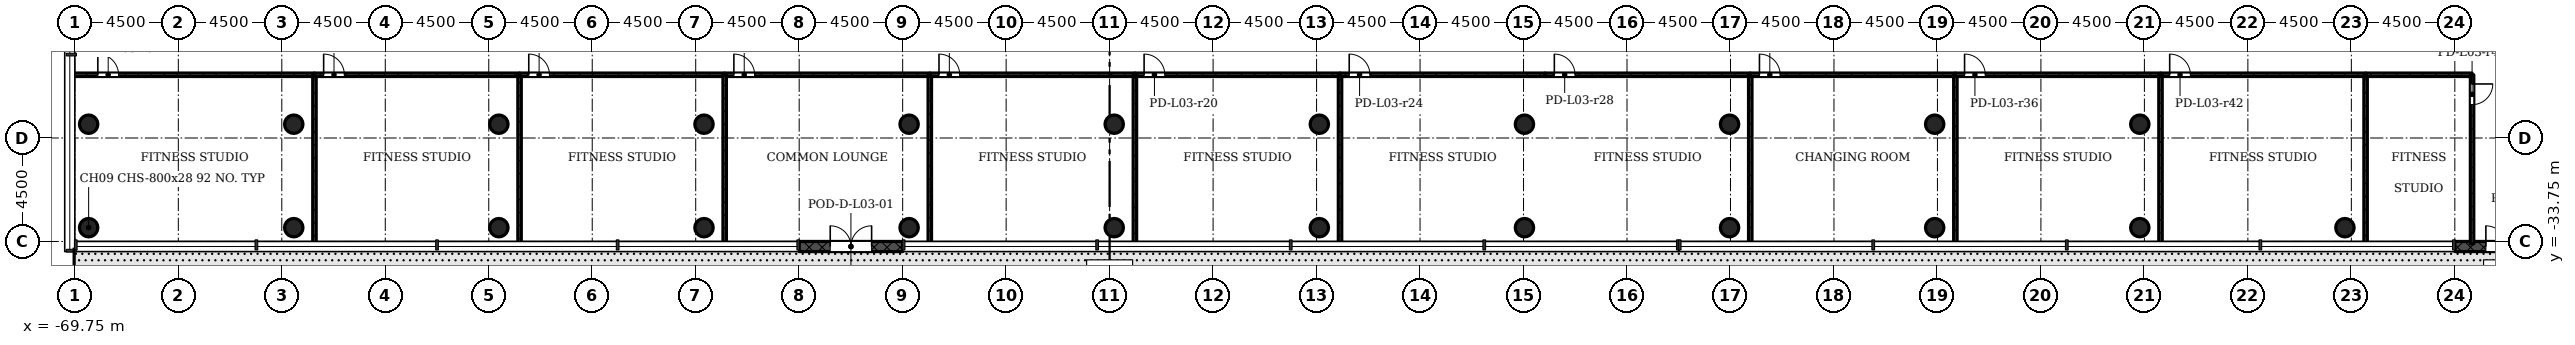
"""IFC4 building model, lengths in metres.
Left out: names, types, materials, properties, quantities, classifications, styles, units other than length and angle.
Written with IfcOpenShell. Run it as: python <this file> out.ifc"""

import sys

from ifc_helpers import new_model, si_unit, direction, frame, frame_2d, origin, origin_2d, place, context, subcontext, project, spatial, rectangle, hollow_circle, extrude, element, fill, save


model = new_model("IFC4")
c1 = context("Model", 3, precision=1e-05, world=origin(), true_north=direction((0.0, 1.0)))
c2 = subcontext(c1, "Body", "Model", "MODEL_VIEW")
j1 = project(units=[si_unit("LENGTHUNIT", "METRE"), si_unit("PLANEANGLEUNIT", "RADIAN")], contexts=[c1])
p1 = place(None, origin())
s1 = spatial("IfcSite", under=j1, at=p1, CompositionType="ELEMENT")
p2 = place(p1, origin())
s2 = spatial("IfcBuilding", under=s1, at=p2, CompositionType="ELEMENT")
p3 = place(p2, frame((0.0, 0.0, 15.5)))
s3 = spatial("IfcBuildingStorey", under=s2, at=p3, CompositionType="ELEMENT", Elevation=15.5)
for number, where, z_axis, x_axis in (
    (1, (-69.15, -33.15, 0.0), (0.0, 0.0, 1.0), (1.0, 0.0, 0.0)),
    (2, (-60.23, -33.15, 0.0), (0.0, 0.0, 1.0), (1.0, 0.0, 0.0)),
    (3, (-51.31, -33.15, 0.0), (0.0, 0.0, 1.0), (1.0, 0.0, 0.0)),
    (4, (-42.39, -33.15, 0.0), (0.0, 0.0, 1.0), (1.0, 0.0, 0.0)),
    (5, (-33.47, -33.15, 0.0), (0.0, 0.0, 1.0), (1.0, 0.0, 0.0)),
    (6, (-24.55, -33.15, 0.0), (0.0, 0.0, 1.0), (1.0, 0.0, 0.0)),
    (7, (-15.63, -33.15, 0.0), (0.0, 0.0, 1.0), (1.0, 0.0, 0.0)),
    (8, (-6.71, -33.15, 0.0), (0.0, 0.0, 1.0), (1.0, 0.0, 0.0)),
    (9, (2.21, -33.15, 0.0), (0.0, 0.0, 1.0), (1.0, 0.0, 0.0)),
    (10, (11.13, -33.15, 0.0), (0.0, 0.0, 1.0), (1.0, 0.0, 0.0)),
    (11, (20.05, -33.15, 0.0), (0.0, 0.0, 1.0), (1.0, 0.0, 0.0)),
    (12, (28.97, -33.15, 0.0), (0.0, 0.0, 1.0), (1.0, 0.0, 0.0)),
):
    element("IfcColumn", number, at=place(p3, frame(where, z_axis=z_axis, x_axis=x_axis)), inside=s3, PredefinedType="COLUMN", context=c2, shape_type="SweptSolid", body=[
        extrude(hollow_circle(Radius=0.4, WallThickness=0.028, at=origin_2d()), origin(), (0.0, 0.0, 1.0), 4.08),
    ])
for number, where, z_axis, x_axis in (
    (13, (-69.15, -28.65, 0.0), (0.0, 0.0, 1.0), (1.0, 0.0, 0.0)),
    (14, (-60.23, -28.65, 0.0), (0.0, 0.0, 1.0), (1.0, 0.0, 0.0)),
    (15, (-51.31, -28.65, 0.0), (0.0, 0.0, 1.0), (1.0, 0.0, 0.0)),
    (16, (-42.39, -28.65, 0.0), (0.0, 0.0, 1.0), (1.0, 0.0, 0.0)),
    (17, (-33.47, -28.65, 0.0), (0.0, 0.0, 1.0), (1.0, 0.0, 0.0)),
    (18, (-24.55, -28.65, 0.0), (0.0, 0.0, 1.0), (1.0, 0.0, 0.0)),
    (19, (-15.63, -28.65, 0.0), (0.0, 0.0, 1.0), (1.0, 0.0, 0.0)),
    (20, (-6.71, -28.65, 0.0), (0.0, 0.0, 1.0), (1.0, 0.0, 0.0)),
    (21, (2.21, -28.65, 0.0), (0.0, 0.0, 1.0), (1.0, 0.0, 0.0)),
    (22, (11.13, -28.65, 0.0), (0.0, 0.0, 1.0), (1.0, 0.0, 0.0)),
    (23, (20.05, -28.65, 0.0), (0.0, 0.0, 1.0), (1.0, 0.0, 0.0)),
):
    element("IfcColumn", number, at=place(p3, frame(where, z_axis=z_axis, x_axis=x_axis)), inside=s3, PredefinedType="COLUMN", context=c2, shape_type="SweptSolid", body=[
        extrude(hollow_circle(Radius=0.4, WallThickness=0.028, at=origin_2d()), origin(), (0.0, 0.0, 1.0), 4.5),
    ])
p4 = place(p3, frame((-38.25, -33.97, -0.02), z_axis=(0.0, 0.0, 1.0), x_axis=(1.0, 0.0, 0.0)))
e24 = element("IfcWall", 24, at=p4, inside=s3, PredefinedType="STANDARD", context=c2, shape_type="SweptSolid", body=[
    extrude(rectangle(XDim=4.5, YDim=0.44, at=frame_2d((2.25, 0.0))), origin(), (0.0, 0.0, 1.0), 4.22),
])
p5 = place(p4, frame((1.35, 0.0, 0.02)))
e25 = element("IfcOpeningElement", 25, at=p5, cuts=e24, PredefinedType="OPENING", context=c2, shape_type="SweptSolid", body=[
    extrude(rectangle(XDim=1.8, YDim=2.1, at=frame_2d((0.9, 1.05))), frame((0.0, 0.23, 0.0), z_axis=(0.0, -1.0, 0.0), x_axis=(1.0, 0.0, 0.0)), (0.0, 0.0, 1.0), 0.46),
])
p6 = place(p3, frame((33.75, -33.97, -0.02), z_axis=(0.0, 0.0, 1.0), x_axis=(1.0, 0.0, 0.0)))
e26 = element("IfcWall", 26, at=p6, inside=s3, PredefinedType="STANDARD", context=c2, shape_type="SweptSolid", body=[
    extrude(rectangle(XDim=4.5, YDim=0.44, at=frame_2d((2.25, 0.0))), origin(), (0.0, 0.0, 1.0), 4.22),
])
p7 = place(p6, frame((1.35, 0.0, 0.02)))
e27 = element("IfcOpeningElement", 27, at=p7, cuts=e26, PredefinedType="OPENING", context=c2, shape_type="SweptSolid", body=[
    extrude(rectangle(XDim=1.8, YDim=2.1, at=frame_2d((0.9, 1.05))), frame((0.0, 0.23, 0.0), z_axis=(0.0, -1.0, 0.0), x_axis=(1.0, 0.0, 0.0)), (0.0, 0.0, 1.0), 0.46),
])
p8 = place(p3, frame((-69.85, -26.5, 0.0), z_axis=(0.0, 0.0, 1.0), x_axis=(1.0, 0.0, 0.0)))
e28 = element("IfcWall", 28, at=p8, inside=s3, PredefinedType="PARTITIONING", context=c2, shape_type="SweptSolid", body=[
    extrude(rectangle(XDim=10.52, YDim=0.15, at=frame_2d((5.26, 0.0))), origin(), (0.0, 0.0, 1.0), 4.08),
])
p9 = place(p8, frame((1.1, 0.0, 0.0)))
e29 = element("IfcOpeningElement", 29, at=p9, cuts=e28, PredefinedType="OPENING", context=c2, shape_type="SweptSolid", body=[
    extrude(rectangle(XDim=0.9, YDim=2.1, at=frame_2d((0.45, 1.05))), frame((0.0, 0.085, 0.0), z_axis=(0.0, -1.0, 0.0), x_axis=(1.0, 0.0, 0.0)), (0.0, 0.0, 1.0), 0.17),
])
p10 = place(p3, frame((-59.33, -26.5, 0.0), z_axis=(0.0, 0.0, 1.0), x_axis=(0.0, -1.0, 0.0)))
e30 = element("IfcWall", 30, at=p10, inside=s3, PredefinedType="PARTITIONING", context=c2, shape_type="SweptSolid", body=[
    extrude(rectangle(XDim=7.35, YDim=0.15, at=frame_2d((3.675, 0.0))), origin(), (0.0, 0.0, 1.0), 4.08),
])
p11 = place(p3, frame((-59.33, -26.5, 0.0), z_axis=(0.0, 0.0, 1.0), x_axis=(1.0, 0.0, 0.0)))
e31 = element("IfcWall", 31, at=p11, inside=s3, PredefinedType="PARTITIONING", context=c2, shape_type="SweptSolid", body=[
    extrude(rectangle(XDim=8.92, YDim=0.15, at=frame_2d((4.46, 0.0))), origin(), (0.0, 0.0, 1.0), 4.08),
])
p12 = place(p11, frame((0.4, 0.0, 0.0)))
e32 = element("IfcOpeningElement", 32, at=p12, cuts=e31, PredefinedType="OPENING", context=c2, shape_type="SweptSolid", body=[
    extrude(rectangle(XDim=0.9, YDim=2.1, at=frame_2d((0.45, 1.05))), frame((0.0, 0.085, 0.0), z_axis=(0.0, -1.0, 0.0), x_axis=(1.0, 0.0, 0.0)), (0.0, 0.0, 1.0), 0.17),
])
p13 = place(p3, frame((-50.41, -26.5, 0.0), z_axis=(0.0, 0.0, 1.0), x_axis=(0.0, -1.0, 0.0)))
e33 = element("IfcWall", 33, at=p13, inside=s3, PredefinedType="PARTITIONING", context=c2, shape_type="SweptSolid", body=[
    extrude(rectangle(XDim=7.35, YDim=0.15, at=frame_2d((3.675, 0.0))), origin(), (0.0, 0.0, 1.0), 4.08),
])
p14 = place(p3, frame((-50.41, -26.5, 0.0), z_axis=(0.0, 0.0, 1.0), x_axis=(1.0, 0.0, 0.0)))
e34 = element("IfcWall", 34, at=p14, inside=s3, PredefinedType="PARTITIONING", context=c2, shape_type="SweptSolid", body=[
    extrude(rectangle(XDim=8.92, YDim=0.15, at=frame_2d((4.46, 0.0))), origin(), (0.0, 0.0, 1.0), 4.08),
])
p15 = place(p14, frame((0.4, 0.0, 0.0)))
e35 = element("IfcOpeningElement", 35, at=p15, cuts=e34, PredefinedType="OPENING", context=c2, shape_type="SweptSolid", body=[
    extrude(rectangle(XDim=0.9, YDim=2.1, at=frame_2d((0.45, 1.05))), frame((0.0, 0.085, 0.0), z_axis=(0.0, -1.0, 0.0), x_axis=(1.0, 0.0, 0.0)), (0.0, 0.0, 1.0), 0.17),
])
p16 = place(p3, frame((-41.49, -26.5, 0.0), z_axis=(0.0, 0.0, 1.0), x_axis=(1.0, 0.0, 0.0)))
e36 = element("IfcWall", 36, at=p16, inside=s3, PredefinedType="PARTITIONING", context=c2, shape_type="SweptSolid", body=[
    extrude(rectangle(XDim=8.92, YDim=0.15, at=frame_2d((4.46, 0.0))), origin(), (0.0, 0.0, 1.0), 4.08),
])
p17 = place(p16, frame((0.4, 0.0, 0.0)))
e37 = element("IfcOpeningElement", 37, at=p17, cuts=e36, PredefinedType="OPENING", context=c2, shape_type="SweptSolid", body=[
    extrude(rectangle(XDim=0.9, YDim=2.1, at=frame_2d((0.45, 1.05))), frame((0.0, 0.085, 0.0), z_axis=(0.0, -1.0, 0.0), x_axis=(1.0, 0.0, 0.0)), (0.0, 0.0, 1.0), 0.17),
])
for number, where, z_axis, x_axis in (
    (38, (-41.49, -33.85, 0.0), (0.0, 0.0, 1.0), (0.0, 1.0, 0.0)),
    (39, (-32.57, -26.5, 0.0), (0.0, 0.0, 1.0), (0.0, -1.0, 0.0)),
):
    element("IfcWall", number, at=place(p3, frame(where, z_axis=z_axis, x_axis=x_axis)), inside=s3, PredefinedType="PARTITIONING", context=c2, shape_type="SweptSolid", body=[
        extrude(rectangle(XDim=7.35, YDim=0.15, at=frame_2d((3.675, 0.0))), origin(), (0.0, 0.0, 1.0), 4.08),
    ])
p18 = place(p3, frame((-32.57, -26.5, 0.0), z_axis=(0.0, 0.0, 1.0), x_axis=(1.0, 0.0, 0.0)))
e40 = element("IfcWall", 40, at=p18, inside=s3, PredefinedType="PARTITIONING", context=c2, shape_type="SweptSolid", body=[
    extrude(rectangle(XDim=8.92, YDim=0.15, at=frame_2d((4.46, 0.0))), origin(), (0.0, 0.0, 1.0), 4.08),
])
p19 = place(p18, frame((0.4, 0.0, 0.0)))
e41 = element("IfcOpeningElement", 41, at=p19, cuts=e40, PredefinedType="OPENING", context=c2, shape_type="SweptSolid", body=[
    extrude(rectangle(XDim=0.9, YDim=2.1, at=frame_2d((0.45, 1.05))), frame((0.0, 0.085, 0.0), z_axis=(0.0, -1.0, 0.0), x_axis=(1.0, 0.0, 0.0)), (0.0, 0.0, 1.0), 0.17),
])
p20 = place(p3, frame((-23.65, -26.5, 0.0), z_axis=(0.0, 0.0, 1.0), x_axis=(0.0, -1.0, 0.0)))
e42 = element("IfcWall", 42, at=p20, inside=s3, PredefinedType="PARTITIONING", context=c2, shape_type="SweptSolid", body=[
    extrude(rectangle(XDim=7.35, YDim=0.15, at=frame_2d((3.675, 0.0))), origin(), (0.0, 0.0, 1.0), 4.08),
])
p21 = place(p3, frame((-23.65, -26.5, 0.0), z_axis=(0.0, 0.0, 1.0), x_axis=(1.0, 0.0, 0.0)))
e43 = element("IfcWall", 43, at=p21, inside=s3, PredefinedType="PARTITIONING", context=c2, shape_type="SweptSolid", body=[
    extrude(rectangle(XDim=8.92, YDim=0.15, at=frame_2d((4.46, 0.0))), origin(), (0.0, 0.0, 1.0), 4.08),
])
p22 = place(p21, frame((0.4, 0.0, 0.0)))
e44 = element("IfcOpeningElement", 44, at=p22, cuts=e43, PredefinedType="OPENING", context=c2, shape_type="SweptSolid", body=[
    extrude(rectangle(XDim=0.9, YDim=2.1, at=frame_2d((0.45, 1.05))), frame((0.0, 0.085, 0.0), z_axis=(0.0, -1.0, 0.0), x_axis=(1.0, 0.0, 0.0)), (0.0, 0.0, 1.0), 0.17),
])
p23 = place(p3, frame((-14.73, -26.5, 0.0), z_axis=(0.0, 0.0, 1.0), x_axis=(0.0, -1.0, 0.0)))
e45 = element("IfcWall", 45, at=p23, inside=s3, PredefinedType="PARTITIONING", context=c2, shape_type="SweptSolid", body=[
    extrude(rectangle(XDim=7.35, YDim=0.15, at=frame_2d((3.675, 0.0))), origin(), (0.0, 0.0, 1.0), 4.08),
])
p24 = place(p3, frame((-14.73, -26.5, 0.0), z_axis=(0.0, 0.0, 1.0), x_axis=(1.0, 0.0, 0.0)))
e46 = element("IfcWall", 46, at=p24, inside=s3, PredefinedType="PARTITIONING", context=c2, shape_type="SweptSolid", body=[
    extrude(rectangle(XDim=8.92, YDim=0.15, at=frame_2d((4.46, 0.0))), origin(), (0.0, 0.0, 1.0), 4.08),
])
p25 = place(p24, frame((0.4, 0.0, 0.0)))
e47 = element("IfcOpeningElement", 47, at=p25, cuts=e46, PredefinedType="OPENING", context=c2, shape_type="SweptSolid", body=[
    extrude(rectangle(XDim=0.9, YDim=2.1, at=frame_2d((0.45, 1.05))), frame((0.0, 0.085, 0.0), z_axis=(0.0, -1.0, 0.0), x_axis=(1.0, 0.0, 0.0)), (0.0, 0.0, 1.0), 0.17),
])
p26 = place(p3, frame((-5.81, -26.5, 0.0), z_axis=(0.0, 0.0, 1.0), x_axis=(1.0, 0.0, 0.0)))
e48 = element("IfcWall", 48, at=p26, inside=s3, PredefinedType="PARTITIONING", context=c2, shape_type="SweptSolid", body=[
    extrude(rectangle(XDim=8.92, YDim=0.15, at=frame_2d((4.46, 0.0))), origin(), (0.0, 0.0, 1.0), 4.08),
])
p27 = place(p26, frame((0.4, 0.0, 0.0)))
e49 = element("IfcOpeningElement", 49, at=p27, cuts=e48, PredefinedType="OPENING", context=c2, shape_type="SweptSolid", body=[
    extrude(rectangle(XDim=0.9, YDim=2.1, at=frame_2d((0.45, 1.05))), frame((0.0, 0.085, 0.0), z_axis=(0.0, -1.0, 0.0), x_axis=(1.0, 0.0, 0.0)), (0.0, 0.0, 1.0), 0.17),
])
p28 = place(p3, frame((3.11, -26.5, 0.0), z_axis=(0.0, 0.0, 1.0), x_axis=(0.0, -1.0, 0.0)))
e50 = element("IfcWall", 50, at=p28, inside=s3, PredefinedType="PARTITIONING", context=c2, shape_type="SweptSolid", body=[
    extrude(rectangle(XDim=7.35, YDim=0.15, at=frame_2d((3.675, 0.0))), origin(), (0.0, 0.0, 1.0), 4.08),
])
p29 = place(p3, frame((3.11, -26.5, 0.0), z_axis=(0.0, 0.0, 1.0), x_axis=(1.0, 0.0, 0.0)))
e51 = element("IfcWall", 51, at=p29, inside=s3, PredefinedType="PARTITIONING", context=c2, shape_type="SweptSolid", body=[
    extrude(rectangle(XDim=8.92, YDim=0.15, at=frame_2d((4.46, 0.0))), origin(), (0.0, 0.0, 1.0), 4.08),
])
p30 = place(p29, frame((0.4, 0.0, 0.0)))
e52 = element("IfcOpeningElement", 52, at=p30, cuts=e51, PredefinedType="OPENING", context=c2, shape_type="SweptSolid", body=[
    extrude(rectangle(XDim=0.9, YDim=2.1, at=frame_2d((0.45, 1.05))), frame((0.0, 0.085, 0.0), z_axis=(0.0, -1.0, 0.0), x_axis=(1.0, 0.0, 0.0)), (0.0, 0.0, 1.0), 0.17),
])
p31 = place(p3, frame((12.03, -26.5, 0.0), z_axis=(0.0, 0.0, 1.0), x_axis=(0.0, -1.0, 0.0)))
e53 = element("IfcWall", 53, at=p31, inside=s3, PredefinedType="PARTITIONING", context=c2, shape_type="SweptSolid", body=[
    extrude(rectangle(XDim=7.35, YDim=0.15, at=frame_2d((3.675, 0.0))), origin(), (0.0, 0.0, 1.0), 4.08),
])
p32 = place(p3, frame((12.03, -26.5, 0.0), z_axis=(0.0, 0.0, 1.0), x_axis=(1.0, 0.0, 0.0)))
e54 = element("IfcWall", 54, at=p32, inside=s3, PredefinedType="PARTITIONING", context=c2, shape_type="SweptSolid", body=[
    extrude(rectangle(XDim=8.92, YDim=0.15, at=frame_2d((4.46, 0.0))), origin(), (0.0, 0.0, 1.0), 4.08),
])
p33 = place(p32, frame((0.4, 0.0, 0.0)))
e55 = element("IfcOpeningElement", 55, at=p33, cuts=e54, PredefinedType="OPENING", context=c2, shape_type="SweptSolid", body=[
    extrude(rectangle(XDim=0.9, YDim=2.1, at=frame_2d((0.45, 1.05))), frame((0.0, 0.085, 0.0), z_axis=(0.0, -1.0, 0.0), x_axis=(1.0, 0.0, 0.0)), (0.0, 0.0, 1.0), 0.17),
])
p34 = place(p3, frame((20.95, -26.5, 0.0), z_axis=(0.0, 0.0, 1.0), x_axis=(0.0, -1.0, 0.0)))
e56 = element("IfcWall", 56, at=p34, inside=s3, PredefinedType="PARTITIONING", context=c2, shape_type="SweptSolid", body=[
    extrude(rectangle(XDim=7.35, YDim=0.15, at=frame_2d((3.675, 0.0))), origin(), (0.0, 0.0, 1.0), 4.08),
])
p35 = place(p3, frame((20.95, -26.5, 0.0), z_axis=(0.0, 0.0, 1.0), x_axis=(1.0, 0.0, 0.0)))
e57 = element("IfcWall", 57, at=p35, inside=s3, PredefinedType="PARTITIONING", context=c2, shape_type="SweptSolid", body=[
    extrude(rectangle(XDim=8.92, YDim=0.15, at=frame_2d((4.46, 0.0))), origin(), (0.0, 0.0, 1.0), 4.08),
])
p36 = place(p35, frame((0.4, 0.0, 0.0)))
e58 = element("IfcOpeningElement", 58, at=p36, cuts=e57, PredefinedType="OPENING", context=c2, shape_type="SweptSolid", body=[
    extrude(rectangle(XDim=0.9, YDim=2.1, at=frame_2d((0.45, 1.05))), frame((0.0, 0.085, 0.0), z_axis=(0.0, -1.0, 0.0), x_axis=(1.0, 0.0, 0.0)), (0.0, 0.0, 1.0), 0.17),
])
p37 = place(p3, frame((29.87, -26.5, 0.0), z_axis=(0.0, 0.0, 1.0), x_axis=(0.0, -1.0, 0.0)))
e59 = element("IfcWall", 59, at=p37, inside=s3, PredefinedType="PARTITIONING", context=c2, shape_type="SweptSolid", body=[
    extrude(rectangle(XDim=7.35, YDim=0.15, at=frame_2d((3.675, 0.0))), origin(), (0.0, 0.0, 1.0), 4.08),
])
p38 = place(p3, frame((29.87, -26.5, 0.0), z_axis=(0.0, 0.0, 1.0), x_axis=(1.0, 0.0, 0.0)))
e60 = element("IfcWall", 60, at=p38, inside=s3, PredefinedType="PARTITIONING", context=c2, shape_type="SweptSolid", body=[
    extrude(rectangle(XDim=4.63, YDim=0.15, at=frame_2d((2.315, 0.0))), origin(), (0.0, 0.0, 1.0), 4.08),
])
p39 = place(p3, frame((34.5, -26.5, 0.0), z_axis=(0.0, 0.0, 1.0), x_axis=(0.0, -1.0, 0.0)))
e61 = element("IfcWall", 61, at=p39, inside=s3, PredefinedType="PARTITIONING", context=c2, shape_type="SweptSolid", body=[
    extrude(rectangle(XDim=7.35, YDim=0.15, at=frame_2d((3.675, 0.0))), origin(), (0.0, 0.0, 1.0), 4.08),
])
p40 = place(p39, frame((0.4, 0.0, 0.0)))
e62 = element("IfcOpeningElement", 62, at=p40, cuts=e61, PredefinedType="OPENING", context=c2, shape_type="SweptSolid", body=[
    extrude(rectangle(XDim=0.9, YDim=2.1, at=frame_2d((0.45, 1.05))), frame((0.0, 0.085, 0.0), z_axis=(0.0, -1.0, 0.0), x_axis=(1.0, 0.0, 0.0)), (0.0, 0.0, 1.0), 0.17),
])
p41 = place(p5, origin())
e63 = element("IfcDoor", 63, at=p41, inside=s3, OperationType="DOUBLE_DOOR_SINGLE_SWING", PredefinedType="DOOR", context=c2, shape_type="SweptSolid", body=[
    extrude(rectangle(XDim=1.8, YDim=2.1, at=frame_2d((0.9, 1.05))), frame((0.0, 0.025, 0.0), z_axis=(0.0, -1.0, 0.0), x_axis=(1.0, 0.0, 0.0)), (0.0, 0.0, 1.0), 0.05),
])
fill(e25, e63)
p42 = place(p7, origin())
e64 = element("IfcDoor", 64, at=p42, inside=s3, OperationType="DOUBLE_DOOR_SINGLE_SWING", PredefinedType="DOOR", context=c2, shape_type="SweptSolid", body=[
    extrude(rectangle(XDim=1.8, YDim=2.1, at=frame_2d((0.9, 1.05))), frame((0.0, 0.025, 0.0), z_axis=(0.0, -1.0, 0.0), x_axis=(1.0, 0.0, 0.0)), (0.0, 0.0, 1.0), 0.05),
])
fill(e27, e64)
p43 = place(p9, origin())
e65 = element("IfcDoor", 65, at=p43, inside=s3, OperationType="SINGLE_SWING_RIGHT", PredefinedType="DOOR", context=c2, shape_type="SweptSolid", body=[
    extrude(rectangle(XDim=0.9, YDim=2.1, at=frame_2d((0.45, 1.05))), frame((0.0, 0.025, 0.0), z_axis=(0.0, -1.0, 0.0), x_axis=(1.0, 0.0, 0.0)), (0.0, 0.0, 1.0), 0.05),
])
fill(e29, e65)
p44 = place(p12, origin())
e66 = element("IfcDoor", 66, at=p44, inside=s3, OperationType="SINGLE_SWING_RIGHT", PredefinedType="DOOR", context=c2, shape_type="SweptSolid", body=[
    extrude(rectangle(XDim=0.9, YDim=2.1, at=frame_2d((0.45, 1.05))), frame((0.0, 0.025, 0.0), z_axis=(0.0, -1.0, 0.0), x_axis=(1.0, 0.0, 0.0)), (0.0, 0.0, 1.0), 0.05),
])
fill(e32, e66)
p45 = place(p15, origin())
e67 = element("IfcDoor", 67, at=p45, inside=s3, OperationType="SINGLE_SWING_RIGHT", PredefinedType="DOOR", context=c2, shape_type="SweptSolid", body=[
    extrude(rectangle(XDim=0.9, YDim=2.1, at=frame_2d((0.45, 1.05))), frame((0.0, 0.025, 0.0), z_axis=(0.0, -1.0, 0.0), x_axis=(1.0, 0.0, 0.0)), (0.0, 0.0, 1.0), 0.05),
])
fill(e35, e67)
p46 = place(p17, origin())
e68 = element("IfcDoor", 68, at=p46, inside=s3, OperationType="SINGLE_SWING_RIGHT", PredefinedType="DOOR", context=c2, shape_type="SweptSolid", body=[
    extrude(rectangle(XDim=0.9, YDim=2.1, at=frame_2d((0.45, 1.05))), frame((0.0, 0.025, 0.0), z_axis=(0.0, -1.0, 0.0), x_axis=(1.0, 0.0, 0.0)), (0.0, 0.0, 1.0), 0.05),
])
fill(e37, e68)
p47 = place(p19, origin())
e69 = element("IfcDoor", 69, at=p47, inside=s3, OperationType="SINGLE_SWING_RIGHT", PredefinedType="DOOR", context=c2, shape_type="SweptSolid", body=[
    extrude(rectangle(XDim=0.9, YDim=2.1, at=frame_2d((0.45, 1.05))), frame((0.0, 0.025, 0.0), z_axis=(0.0, -1.0, 0.0), x_axis=(1.0, 0.0, 0.0)), (0.0, 0.0, 1.0), 0.05),
])
fill(e41, e69)
p48 = place(p22, origin())
e70 = element("IfcDoor", 70, at=p48, inside=s3, OperationType="SINGLE_SWING_RIGHT", PredefinedType="DOOR", context=c2, shape_type="SweptSolid", body=[
    extrude(rectangle(XDim=0.9, YDim=2.1, at=frame_2d((0.45, 1.05))), frame((0.0, 0.025, 0.0), z_axis=(0.0, -1.0, 0.0), x_axis=(1.0, 0.0, 0.0)), (0.0, 0.0, 1.0), 0.05),
])
fill(e44, e70)
p49 = place(p25, origin())
e71 = element("IfcDoor", 71, at=p49, inside=s3, OperationType="SINGLE_SWING_RIGHT", PredefinedType="DOOR", context=c2, shape_type="SweptSolid", body=[
    extrude(rectangle(XDim=0.9, YDim=2.1, at=frame_2d((0.45, 1.05))), frame((0.0, 0.025, 0.0), z_axis=(0.0, -1.0, 0.0), x_axis=(1.0, 0.0, 0.0)), (0.0, 0.0, 1.0), 0.05),
])
fill(e47, e71)
p50 = place(p27, origin())
e72 = element("IfcDoor", 72, at=p50, inside=s3, OperationType="SINGLE_SWING_RIGHT", PredefinedType="DOOR", context=c2, shape_type="SweptSolid", body=[
    extrude(rectangle(XDim=0.9, YDim=2.1, at=frame_2d((0.45, 1.05))), frame((0.0, 0.025, 0.0), z_axis=(0.0, -1.0, 0.0), x_axis=(1.0, 0.0, 0.0)), (0.0, 0.0, 1.0), 0.05),
])
fill(e49, e72)
p51 = place(p30, origin())
e73 = element("IfcDoor", 73, at=p51, inside=s3, OperationType="SINGLE_SWING_RIGHT", PredefinedType="DOOR", context=c2, shape_type="SweptSolid", body=[
    extrude(rectangle(XDim=0.9, YDim=2.1, at=frame_2d((0.45, 1.05))), frame((0.0, 0.025, 0.0), z_axis=(0.0, -1.0, 0.0), x_axis=(1.0, 0.0, 0.0)), (0.0, 0.0, 1.0), 0.05),
])
fill(e52, e73)
p52 = place(p33, origin())
e74 = element("IfcDoor", 74, at=p52, inside=s3, OperationType="SINGLE_SWING_RIGHT", PredefinedType="DOOR", context=c2, shape_type="SweptSolid", body=[
    extrude(rectangle(XDim=0.9, YDim=2.1, at=frame_2d((0.45, 1.05))), frame((0.0, 0.025, 0.0), z_axis=(0.0, -1.0, 0.0), x_axis=(1.0, 0.0, 0.0)), (0.0, 0.0, 1.0), 0.05),
])
fill(e55, e74)
p53 = place(p36, origin())
e75 = element("IfcDoor", 75, at=p53, inside=s3, OperationType="SINGLE_SWING_RIGHT", PredefinedType="DOOR", context=c2, shape_type="SweptSolid", body=[
    extrude(rectangle(XDim=0.9, YDim=2.1, at=frame_2d((0.45, 1.05))), frame((0.0, 0.025, 0.0), z_axis=(0.0, -1.0, 0.0), x_axis=(1.0, 0.0, 0.0)), (0.0, 0.0, 1.0), 0.05),
])
fill(e58, e75)
p54 = place(p40, origin())
e76 = element("IfcDoor", 76, at=p54, inside=s3, OperationType="SINGLE_SWING_RIGHT", PredefinedType="DOOR", context=c2, shape_type="SweptSolid", body=[
    extrude(rectangle(XDim=0.9, YDim=2.1, at=frame_2d((0.45, 1.05))), frame((0.0, 0.025, 0.0), z_axis=(0.0, -1.0, 0.0), x_axis=(1.0, 0.0, 0.0)), (0.0, 0.0, 1.0), 0.05),
])
fill(e62, e76)
save(model, sys.argv[1])
